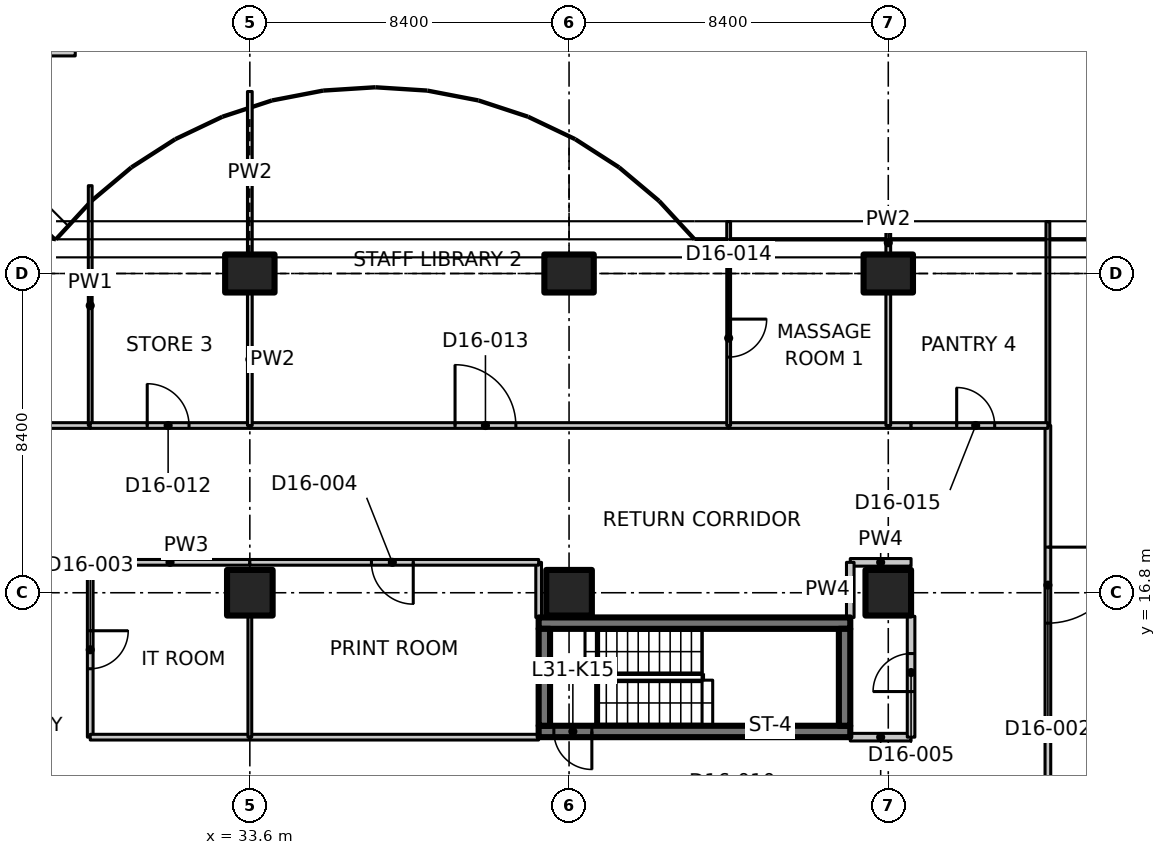
"""IFC4 building model, lengths in metres.
Left out: names, types, materials, properties, quantities, classifications, styles, units other than length and angle.
Written with IfcOpenShell. Run it as: python <this file> out.ifc"""

import sys

from ifc_helpers import new_model, si_unit, direction, frame, frame_2d, origin, origin_2d, place, context, subcontext, project, spatial, polyline, rectangle, outline, extrude, element, fill, save


model = new_model("IFC4")
c1 = context("Model", 3, precision=1e-05, world=origin(), true_north=direction((0.0, 1.0)))
c2 = subcontext(c1, "Body", "Model", "MODEL_VIEW")
j1 = project(units=[si_unit("LENGTHUNIT", "METRE"), si_unit("PLANEANGLEUNIT", "RADIAN")], contexts=[c1])
p1 = place(None, origin())
s1 = spatial("IfcSite", under=j1, at=p1, CompositionType="ELEMENT")
p2 = place(p1, origin())
s2 = spatial("IfcBuilding", under=s1, at=p2, CompositionType="ELEMENT")
p3 = place(p2, frame((0.0, 0.0, 127.7)))
s3 = spatial("IfcBuildingStorey", under=s2, at=p3, CompositionType="ELEMENT", Elevation=127.7)
p4 = place(p3, frame((33.6, 16.8, 0.0), z_axis=(0.0, 0.0, 1.0), x_axis=(1.0, 0.0, 0.0)))
e1 = element("IfcColumn", 1, at=p4, inside=s3, PredefinedType="COLUMN", context=c2, shape_type="SweptSolid", body=[
    extrude(rectangle(XDim=1.2, YDim=1.2, at=origin_2d()), origin(), (0.0, 0.0, 1.0), 3.35),
])
p5 = place(p3, frame((33.6, 25.2, 0.0), z_axis=(0.0, 0.0, 1.0), x_axis=(0.0, 1.0, 0.0)))
e2 = element("IfcColumn", 2, at=p5, inside=s3, PredefinedType="COLUMN", context=c2, shape_type="SweptSolid", body=[
    extrude(rectangle(XDim=1.0, YDim=1.3, at=origin_2d()), origin(), (0.0, 0.0, 1.0), 3.35),
])
p6 = place(p3, frame((42.0, 16.8, 0.0), z_axis=(0.0, 0.0, 1.0), x_axis=(1.0, 0.0, 0.0)))
e3 = element("IfcColumn", 3, at=p6, inside=s3, PredefinedType="COLUMN", context=c2, shape_type="SweptSolid", body=[
    extrude(rectangle(XDim=1.2, YDim=1.2, at=origin_2d()), origin(), (0.0, 0.0, 1.0), 3.35),
])
p7 = place(p3, frame((42.0, 25.2, 0.0), z_axis=(0.0, 0.0, 1.0), x_axis=(0.0, 1.0, 0.0)))
e4 = element("IfcColumn", 4, at=p7, inside=s3, PredefinedType="COLUMN", context=c2, shape_type="SweptSolid", body=[
    extrude(rectangle(XDim=1.0, YDim=1.3, at=origin_2d()), origin(), (0.0, 0.0, 1.0), 3.35),
])
p8 = place(p3, frame((50.4, 16.8, 0.0), z_axis=(0.0, 0.0, 1.0), x_axis=(1.0, 0.0, 0.0)))
e5 = element("IfcColumn", 5, at=p8, inside=s3, PredefinedType="COLUMN", context=c2, shape_type="SweptSolid", body=[
    extrude(rectangle(XDim=1.2, YDim=1.2, at=origin_2d()), origin(), (0.0, 0.0, 1.0), 3.35),
])
p9 = place(p3, frame((50.4, 25.2, 0.0), z_axis=(0.0, 0.0, 1.0), x_axis=(0.0, 1.0, 0.0)))
e6 = element("IfcColumn", 6, at=p9, inside=s3, PredefinedType="COLUMN", context=c2, shape_type="SweptSolid", body=[
    extrude(rectangle(XDim=1.0, YDim=1.3, at=origin_2d()), origin(), (0.0, 0.0, 1.0), 3.35),
])
p10 = place(p3, frame((49.4, 13.15, 0.0), z_axis=(0.0, 0.0, 1.0), x_axis=(-1.0, 0.0, 0.0)))
e7 = element("IfcWall", 7, at=p10, inside=s3, PredefinedType="SHEAR", context=c2, shape_type="SweptSolid", body=[
    extrude(rectangle(XDim=8.2, YDim=0.3, at=frame_2d((4.1, 0.0))), origin(), (0.0, 0.0, 1.0), 3.35),
])
p11 = place(p10, frame((6.8, 0.0, 0.0)))
e8 = element("IfcOpeningElement", 8, at=p11, cuts=e7, PredefinedType="OPENING", context=c2, shape_type="SweptSolid", body=[
    extrude(rectangle(XDim=1.0, YDim=2.1, at=frame_2d((0.5, 1.05))), frame((0.0, 0.16, 0.0), z_axis=(0.0, -1.0, 0.0), x_axis=(1.0, 0.0, 0.0)), (0.0, 0.0, 1.0), 0.32),
])
p12 = place(p3, frame((41.2, 16.0, 0.0), z_axis=(0.0, 0.0, 1.0), x_axis=(1.0, 0.0, 0.0)))
e9 = element("IfcWall", 9, at=p12, inside=s3, PredefinedType="SHEAR", context=c2, shape_type="SweptSolid", body=[
    extrude(rectangle(XDim=8.2, YDim=0.3, at=frame_2d((4.1, 0.0))), origin(), (0.0, 0.0, 1.0), 3.35),
])
for number, where, z_axis, x_axis in (
    (10, (41.35, 13.3, 0.0), (0.0, 0.0, 1.0), (0.0, 1.0, 0.0)),
    (11, (49.25, 13.3, 0.0), (0.0, 0.0, 1.0), (0.0, 1.0, 0.0)),
):
    element("IfcWall", number, at=place(p3, frame(where, z_axis=z_axis, x_axis=x_axis)), inside=s3, PredefinedType="SHEAR", context=c2, shape_type="SweptSolid", body=[
        extrude(rectangle(XDim=2.55, YDim=0.3, at=frame_2d((1.275, 0.0))), origin(), (0.0, 0.0, 1.0), 3.35),
    ])
p13 = place(p3, frame((25.2, 21.2, 0.0), z_axis=(0.0, 0.0, 1.0), x_axis=(1.0, 0.0, 0.0)))
e12 = element("IfcWall", 12, at=p13, inside=s3, PredefinedType="PARTITIONING", context=c2, shape_type="SweptSolid", body=[
    extrude(rectangle(XDim=4.2, YDim=0.15, at=frame_2d((2.1, 0.0))), origin(), (0.0, 0.0, 1.0), 3.33),
])
p14 = place(p3, frame((29.4, 17.6, 0.0), z_axis=(0.0, 0.0, 1.0), x_axis=(0.0, -1.0, 0.0)))
e13 = element("IfcWall", 13, at=p14, inside=s3, PredefinedType="PARTITIONING", context=c2, shape_type="SweptSolid", body=[
    extrude(rectangle(XDim=4.6, YDim=0.15, at=frame_2d((2.3, 0.0))), origin(), (0.0, 0.0, 1.0), 3.33),
])
p15 = place(p14, frame((1.8, 0.0, 0.0)))
e14 = element("IfcOpeningElement", 14, at=p15, cuts=e13, PredefinedType="OPENING", context=c2, shape_type="SweptSolid", body=[
    extrude(rectangle(XDim=1.0, YDim=2.1, at=frame_2d((0.5, 1.05))), frame((0.0, 0.085, 0.0), z_axis=(0.0, -1.0, 0.0), x_axis=(1.0, 0.0, 0.0)), (0.0, 0.0, 1.0), 0.17),
])
p16 = place(p3, frame((29.4, 27.511, 0.0), z_axis=(0.0, 0.0, 1.0), x_axis=(0.0, -1.0, 0.0)))
e15 = element("IfcWall", 15, at=p16, inside=s3, PredefinedType="PARTITIONING", context=c2, shape_type="SweptSolid", body=[
    extrude(outline(polyline([(0.0, 0.0), (6.311, 0.0), (6.311, 3.33), (2.761, 3.33), (2.759, 2.98), (1.863, 2.98), (1.861, 3.33), (0.236, 3.33), (0.0, 3.33), (0.0, 0.0)])), frame((0.0, 0.05, 0.0), z_axis=(0.0, -1.0, 0.0), x_axis=(1.0, 0.0, 0.0)), (0.0, 0.0, 1.0), 0.1),
])
p17 = place(p3, frame((25.2, 31.0, 0.0), z_axis=(0.0, 0.0, 1.0), x_axis=(1.0, 0.0, 0.0)))
e16 = element("IfcWall", 16, at=p17, inside=s3, PredefinedType="PARTITIONING", context=c2, shape_type="SweptSolid", body=[
    extrude(rectangle(XDim=3.806, YDim=0.15, at=frame_2d((1.903, 0.0))), origin(), (0.0, 0.0, 1.0), 2.98),
])
p18 = place(p3, frame((54.6, 13.0, 0.0), z_axis=(0.0, 0.0, 1.0), x_axis=(0.0, -1.0, 0.0)))
e17 = element("IfcWall", 17, at=p18, inside=s3, PredefinedType="PARTITIONING", context=c2, shape_type="SweptSolid", body=[
    extrude(rectangle(XDim=3.4, YDim=0.15, at=frame_2d((1.7, 0.0))), origin(), (0.0, 0.0, 1.0), 3.33),
])
p19 = place(p3, frame((29.4, 13.0, 0.0), z_axis=(0.0, 0.0, 1.0), x_axis=(1.0, 0.0, 0.0)))
e18 = element("IfcWall", 18, at=p19, inside=s3, PredefinedType="PARTITIONING", context=c2, shape_type="SweptSolid", body=[
    extrude(rectangle(XDim=4.2, YDim=0.15, at=frame_2d((2.1, 0.0))), origin(), (0.0, 0.0, 1.0), 3.33),
])
p20 = place(p3, frame((33.6, 13.0, 0.0), z_axis=(0.0, 0.0, 1.0), x_axis=(1.0, 0.0, 0.0)))
e19 = element("IfcWall", 19, at=p20, inside=s3, PredefinedType="PARTITIONING", context=c2, shape_type="SweptSolid", body=[
    extrude(rectangle(XDim=7.6, YDim=0.15, at=frame_2d((3.8, 0.0))), origin(), (0.0, 0.0, 1.0), 3.33),
])
p21 = place(p3, frame((49.4, 13.0, 0.0), z_axis=(0.0, 0.0, 1.0), x_axis=(1.0, 0.0, 0.0)))
e20 = element("IfcWall", 20, at=p21, inside=s3, PredefinedType="PARTITIONING", context=c2, shape_type="SweptSolid", body=[
    extrude(rectangle(XDim=1.6, YDim=0.2, at=frame_2d((0.8, 0.0))), origin(), (0.0, 0.0, 1.0), 3.33),
])
p22 = place(p3, frame((54.6, 21.2, 0.0), z_axis=(0.0, 0.0, 1.0), x_axis=(0.0, -1.0, 0.0)))
e21 = element("IfcWall", 21, at=p22, inside=s3, PredefinedType="PARTITIONING", context=c2, shape_type="SweptSolid", body=[
    extrude(rectangle(XDim=8.2, YDim=0.15, at=frame_2d((4.1, 0.0))), origin(), (0.0, 0.0, 1.0), 3.33),
])
p23 = place(p22, frame((3.2, 0.0, 0.0)))
e22 = element("IfcOpeningElement", 22, at=p23, cuts=e21, PredefinedType="OPENING", context=c2, shape_type="SweptSolid", body=[
    extrude(rectangle(XDim=2.0, YDim=2.4, at=frame_2d((1.0, 1.2))), frame((0.0, 0.085, 0.0), z_axis=(0.0, -1.0, 0.0), x_axis=(1.0, 0.0, 0.0)), (0.0, 0.0, 1.0), 0.17),
])
p24 = place(p3, frame((54.6, 21.2, 0.0), z_axis=(0.0, 0.0, 1.0), x_axis=(0.0, 1.0, 0.0)))
e23 = element("IfcWall", 23, at=p24, inside=s3, PredefinedType="PARTITIONING", context=c2, shape_type="SweptSolid", body=[
    extrude(outline(polyline([(0.0, 0.0), (5.365, 0.0), (5.365, 3.33), (5.1, 3.33), (4.45, 3.33), (4.448, 2.98), (3.552, 2.98), (3.55, 3.33), (0.0, 3.33), (0.0, 0.0)])), frame((0.0, 0.05, 0.0), z_axis=(0.0, -1.0, 0.0), x_axis=(1.0, 0.0, 0.0)), (0.0, 0.0, 1.0), 0.1),
])
p25 = place(p3, frame((33.6, 17.6, 0.0), z_axis=(0.0, 0.0, 1.0), x_axis=(-1.0, 0.0, 0.0)))
e24 = element("IfcWall", 24, at=p25, inside=s3, PredefinedType="PARTITIONING", context=c2, shape_type="SweptSolid", body=[
    extrude(rectangle(XDim=4.2, YDim=0.15, at=frame_2d((2.1, 0.0))), origin(), (0.0, 0.0, 1.0), 3.33),
])
p26 = place(p3, frame((41.2, 16.15, 0.0), z_axis=(0.0, 0.0, 1.0), x_axis=(0.0, 1.0, 0.0)))
e25 = element("IfcWall", 25, at=p26, inside=s3, PredefinedType="PARTITIONING", context=c2, shape_type="SweptSolid", body=[
    extrude(rectangle(XDim=1.45, YDim=0.15, at=frame_2d((0.725, 0.0))), origin(), (0.0, 0.0, 1.0), 3.33),
])
p27 = place(p3, frame((41.2, 17.6, 0.0), z_axis=(0.0, 0.0, 1.0), x_axis=(-1.0, 0.0, 0.0)))
e26 = element("IfcWall", 26, at=p27, inside=s3, PredefinedType="PARTITIONING", context=c2, shape_type="SweptSolid", body=[
    extrude(rectangle(XDim=7.6, YDim=0.15, at=frame_2d((3.8, 0.0))), origin(), (0.0, 0.0, 1.0), 3.33),
])
p28 = place(p27, frame((3.3, 0.0, 0.0)))
e27 = element("IfcOpeningElement", 27, at=p28, cuts=e26, PredefinedType="OPENING", context=c2, shape_type="SweptSolid", body=[
    extrude(rectangle(XDim=1.1, YDim=2.1, at=frame_2d((0.55, 1.05))), frame((0.0, 0.085, 0.0), z_axis=(0.0, -1.0, 0.0), x_axis=(1.0, 0.0, 0.0)), (0.0, 0.0, 1.0), 0.17),
])
p29 = place(p3, frame((51.0, 17.6, 0.0), z_axis=(0.0, 0.0, 1.0), x_axis=(-1.0, 0.0, 0.0)))
e28 = element("IfcWall", 28, at=p29, inside=s3, PredefinedType="PARTITIONING", context=c2, shape_type="SweptSolid", body=[
    extrude(rectangle(XDim=1.6, YDim=0.2, at=frame_2d((0.8, 0.0))), origin(), (0.0, 0.0, 1.0), 3.33),
])
p30 = place(p3, frame((49.4, 17.6, 0.0), z_axis=(0.0, 0.0, 1.0), x_axis=(0.0, -1.0, 0.0)))
e29 = element("IfcWall", 29, at=p30, inside=s3, PredefinedType="PARTITIONING", context=c2, shape_type="SweptSolid", body=[
    extrude(rectangle(XDim=1.45, YDim=0.2, at=frame_2d((0.725, 0.0))), origin(), (0.0, 0.0, 1.0), 3.33),
])
p31 = place(p3, frame((29.4, 21.2, 0.0), z_axis=(0.0, 0.0, 1.0), x_axis=(1.0, 0.0, 0.0)))
e30 = element("IfcWall", 30, at=p31, inside=s3, PredefinedType="PARTITIONING", context=c2, shape_type="SweptSolid", body=[
    extrude(rectangle(XDim=4.2, YDim=0.15, at=frame_2d((2.1, 0.0))), origin(), (0.0, 0.0, 1.0), 3.33),
])
p32 = place(p31, frame((1.5, 0.0, 0.0)))
e31 = element("IfcOpeningElement", 31, at=p32, cuts=e30, PredefinedType="OPENING", context=c2, shape_type="SweptSolid", body=[
    extrude(rectangle(XDim=1.1, YDim=2.1, at=frame_2d((0.55, 1.05))), frame((0.0, 0.085, 0.0), z_axis=(0.0, -1.0, 0.0), x_axis=(1.0, 0.0, 0.0)), (0.0, 0.0, 1.0), 0.17),
])
p33 = place(p3, frame((33.6, 21.2, 0.0), z_axis=(0.0, 0.0, 1.0), x_axis=(1.0, 0.0, 0.0)))
e32 = element("IfcWall", 32, at=p33, inside=s3, PredefinedType="PARTITIONING", context=c2, shape_type="SweptSolid", body=[
    extrude(rectangle(XDim=12.6, YDim=0.15, at=frame_2d((6.3, 0.0))), origin(), (0.0, 0.0, 1.0), 3.33),
])
p34 = place(p33, frame((5.4, 0.0, 0.0)))
e33 = element("IfcOpeningElement", 33, at=p34, cuts=e32, PredefinedType="OPENING", context=c2, shape_type="SweptSolid", body=[
    extrude(rectangle(XDim=1.6, YDim=2.1, at=frame_2d((0.8, 1.05))), frame((0.0, 0.085, 0.0), z_axis=(0.0, -1.0, 0.0), x_axis=(1.0, 0.0, 0.0)), (0.0, 0.0, 1.0), 0.17),
])
p35 = place(p3, frame((46.2, 21.2, 0.0), z_axis=(0.0, 0.0, 1.0), x_axis=(1.0, 0.0, 0.0)))
e34 = element("IfcWall", 34, at=p35, inside=s3, PredefinedType="PARTITIONING", context=c2, shape_type="SweptSolid", body=[
    extrude(rectangle(XDim=4.2, YDim=0.15, at=frame_2d((2.1, 0.0))), origin(), (0.0, 0.0, 1.0), 3.33),
])
p36 = place(p3, frame((50.4, 21.2, 0.0), z_axis=(0.0, 0.0, 1.0), x_axis=(1.0, 0.0, 0.0)))
e35 = element("IfcWall", 35, at=p36, inside=s3, PredefinedType="PARTITIONING", context=c2, shape_type="SweptSolid", body=[
    extrude(rectangle(XDim=0.6, YDim=0.15, at=frame_2d((0.3, 0.0))), origin(), (0.0, 0.0, 1.0), 3.33),
])
p37 = place(p3, frame((51.0, 13.0, 0.0), z_axis=(0.0, 0.0, 1.0), x_axis=(0.0, 1.0, 0.0)))
e36 = element("IfcWall", 36, at=p37, inside=s3, PredefinedType="PARTITIONING", context=c2, shape_type="SweptSolid", body=[
    extrude(rectangle(XDim=3.18, YDim=0.2, at=frame_2d((1.59, 0.0))), origin(), (0.0, 0.0, 1.0), 3.33),
])
p38 = place(p37, frame((1.2, 0.0, 0.0)))
e37 = element("IfcOpeningElement", 37, at=p38, cuts=e36, PredefinedType="OPENING", context=c2, shape_type="SweptSolid", body=[
    extrude(rectangle(XDim=1.0, YDim=2.1, at=frame_2d((0.5, 1.05))), frame((0.0, 0.11, 0.0), z_axis=(0.0, -1.0, 0.0), x_axis=(1.0, 0.0, 0.0)), (0.0, 0.0, 1.0), 0.22),
])
p39 = place(p3, frame((51.0, 21.2, 0.0), z_axis=(0.0, 0.0, 1.0), x_axis=(1.0, 0.0, 0.0)))
e38 = element("IfcWall", 38, at=p39, inside=s3, PredefinedType="PARTITIONING", context=c2, shape_type="SweptSolid", body=[
    extrude(rectangle(XDim=3.6, YDim=0.15, at=frame_2d((1.8, 0.0))), origin(), (0.0, 0.0, 1.0), 3.33),
])
p40 = place(p39, frame((1.2, 0.0, 0.0)))
e39 = element("IfcOpeningElement", 39, at=p40, cuts=e38, PredefinedType="OPENING", context=c2, shape_type="SweptSolid", body=[
    extrude(rectangle(XDim=1.0, YDim=2.1, at=frame_2d((0.5, 1.05))), frame((0.0, 0.085, 0.0), z_axis=(0.0, -1.0, 0.0), x_axis=(1.0, 0.0, 0.0)), (0.0, 0.0, 1.0), 0.17),
])
p41 = place(p3, frame((33.6, 16.18, 0.0), z_axis=(0.0, 0.0, 1.0), x_axis=(0.0, -1.0, 0.0)))
e40 = element("IfcWall", 40, at=p41, inside=s3, PredefinedType="PARTITIONING", context=c2, shape_type="SweptSolid", body=[
    extrude(rectangle(XDim=3.18, YDim=0.1, at=frame_2d((1.59, 0.0))), origin(), (0.0, 0.0, 1.0), 3.33),
])
p42 = place(p3, frame((33.6, 29.988, 0.0), z_axis=(0.0, 0.0, 1.0), x_axis=(0.0, -1.0, 0.0)))
e41 = element("IfcWall", 41, at=p42, inside=s3, PredefinedType="PARTITIONING", context=c2, shape_type="SweptSolid", body=[
    extrude(rectangle(XDim=4.268, YDim=0.125, at=frame_2d((2.134, 0.0))), origin(), (0.0, 0.0, 1.0), 2.98),
])
p43 = place(p3, frame((33.6, 24.68, 0.0), z_axis=(0.0, 0.0, 1.0), x_axis=(0.0, -1.0, 0.0)))
e42 = element("IfcWall", 42, at=p43, inside=s3, PredefinedType="PARTITIONING", context=c2, shape_type="SweptSolid", body=[
    extrude(rectangle(XDim=3.48, YDim=0.125, at=frame_2d((1.74, 0.0))), origin(), (0.0, 0.0, 1.0), 3.33),
])
p44 = place(p3, frame((46.2, 26.565, 0.0), z_axis=(0.0, 0.0, 1.0), x_axis=(0.0, -1.0, 0.0)))
e43 = element("IfcWall", 43, at=p44, inside=s3, PredefinedType="PARTITIONING", context=c2, shape_type="SweptSolid", body=[
    extrude(outline(polyline([(0.0, 0.0), (5.365, 0.0), (5.365, 3.33), (1.815, 3.33), (1.813, 2.98), (0.917, 2.98), (0.915, 3.33), (0.265, 3.33), (0.0, 3.33), (0.0, 0.0)])), frame((0.0, 0.05, 0.0), z_axis=(0.0, -1.0, 0.0), x_axis=(1.0, 0.0, 0.0)), (0.0, 0.0, 1.0), 0.1),
])
p45 = place(p44, frame((2.565, 0.0, 0.0)))
e44 = element("IfcOpeningElement", 44, at=p45, cuts=e43, PredefinedType="OPENING", context=c2, shape_type="SweptSolid", body=[
    extrude(rectangle(XDim=1.0, YDim=2.1, at=frame_2d((0.5, 1.05))), frame((0.0, 0.06, 0.0), z_axis=(0.0, -1.0, 0.0), x_axis=(1.0, 0.0, 0.0)), (0.0, 0.0, 1.0), 0.12),
])
p46 = place(p3, frame((50.4, 26.3, 0.0), z_axis=(0.0, 0.0, 1.0), x_axis=(0.0, -1.0, 0.0)))
e45 = element("IfcWall", 45, at=p46, inside=s3, PredefinedType="PARTITIONING", context=c2, shape_type="SweptSolid", body=[
    extrude(rectangle(XDim=0.58, YDim=0.125, at=frame_2d((0.29, 0.0))), origin(), (0.0, 0.0, 1.0), 3.33),
])
p47 = place(p3, frame((50.4, 24.68, 0.0), z_axis=(0.0, 0.0, 1.0), x_axis=(0.0, -1.0, 0.0)))
e46 = element("IfcWall", 46, at=p47, inside=s3, PredefinedType="PARTITIONING", context=c2, shape_type="SweptSolid", body=[
    extrude(rectangle(XDim=3.48, YDim=0.125, at=frame_2d((1.74, 0.0))), origin(), (0.0, 0.0, 1.0), 3.33),
])
p48 = place(p11, origin())
e47 = element("IfcDoor", 47, at=p48, inside=s3, OperationType="SINGLE_SWING_RIGHT", PredefinedType="DOOR", context=c2, shape_type="SweptSolid", body=[
    extrude(rectangle(XDim=1.0, YDim=2.1, at=frame_2d((0.5, 1.05))), frame((0.0, 0.025, 0.0), z_axis=(0.0, -1.0, 0.0), x_axis=(1.0, 0.0, 0.0)), (0.0, 0.0, 1.0), 0.05),
])
fill(e8, e47)
p49 = place(p23, origin())
e48 = element("IfcDoor", 48, at=p49, inside=s3, OperationType="DOUBLE_DOOR_SINGLE_SWING", PredefinedType="DOOR", context=c2, shape_type="SweptSolid", body=[
    extrude(rectangle(XDim=2.0, YDim=2.4, at=frame_2d((1.0, 1.2))), frame((0.0, 0.025, 0.0), z_axis=(0.0, -1.0, 0.0), x_axis=(1.0, 0.0, 0.0)), (0.0, 0.0, 1.0), 0.05),
])
fill(e22, e48)
p50 = place(p15, origin())
e49 = element("IfcDoor", 49, at=p50, inside=s3, OperationType="SINGLE_SWING_LEFT", PredefinedType="DOOR", context=c2, shape_type="SweptSolid", body=[
    extrude(rectangle(XDim=1.0, YDim=2.1, at=frame_2d((0.5, 1.05))), frame((0.0, 0.025, 0.0), z_axis=(0.0, -1.0, 0.0), x_axis=(1.0, 0.0, 0.0)), (0.0, 0.0, 1.0), 0.05),
])
fill(e14, e49)
p51 = place(p28, origin())
e50 = element("IfcDoor", 50, at=p51, inside=s3, OperationType="SINGLE_SWING_LEFT", PredefinedType="DOOR", context=c2, shape_type="SweptSolid", body=[
    extrude(rectangle(XDim=1.1, YDim=2.1, at=frame_2d((0.55, 1.05))), frame((0.0, 0.025, 0.0), z_axis=(0.0, -1.0, 0.0), x_axis=(1.0, 0.0, 0.0)), (0.0, 0.0, 1.0), 0.05),
])
fill(e27, e50)
p52 = place(p38, origin())
e51 = element("IfcDoor", 51, at=p52, inside=s3, OperationType="SINGLE_SWING_LEFT", PredefinedType="DOOR", context=c2, shape_type="SweptSolid", body=[
    extrude(rectangle(XDim=1.0, YDim=2.1, at=frame_2d((0.5, 1.05))), frame((0.0, 0.025, 0.0), z_axis=(0.0, -1.0, 0.0), x_axis=(1.0, 0.0, 0.0)), (0.0, 0.0, 1.0), 0.05),
])
fill(e37, e51)
p53 = place(p32, origin())
e52 = element("IfcDoor", 52, at=p53, inside=s3, OperationType="SINGLE_SWING_LEFT", PredefinedType="DOOR", context=c2, shape_type="SweptSolid", body=[
    extrude(rectangle(XDim=1.1, YDim=2.1, at=frame_2d((0.55, 1.05))), frame((0.0, 0.025, 0.0), z_axis=(0.0, -1.0, 0.0), x_axis=(1.0, 0.0, 0.0)), (0.0, 0.0, 1.0), 0.05),
])
fill(e31, e52)
p54 = place(p34, origin())
e53 = element("IfcDoor", 53, at=p54, inside=s3, OperationType="DOUBLE_DOOR_SINGLE_SWING", PredefinedType="DOOR", context=c2, shape_type="SweptSolid", body=[
    extrude(rectangle(XDim=1.6, YDim=2.1, at=frame_2d((0.8, 1.05))), frame((0.0, 0.025, 0.0), z_axis=(0.0, -1.0, 0.0), x_axis=(1.0, 0.0, 0.0)), (0.0, 0.0, 1.0), 0.05),
])
fill(e33, e53)
p55 = place(p45, origin())
e54 = element("IfcDoor", 54, at=p55, inside=s3, OperationType="SINGLE_SWING_LEFT", PredefinedType="DOOR", context=c2, shape_type="SweptSolid", body=[
    extrude(rectangle(XDim=1.0, YDim=2.1, at=frame_2d((0.5, 1.05))), frame((0.0, 0.025, 0.0), z_axis=(0.0, -1.0, 0.0), x_axis=(1.0, 0.0, 0.0)), (0.0, 0.0, 1.0), 0.05),
])
fill(e44, e54)
p56 = place(p40, origin())
e55 = element("IfcDoor", 55, at=p56, inside=s3, OperationType="SINGLE_SWING_LEFT", PredefinedType="DOOR", context=c2, shape_type="SweptSolid", body=[
    extrude(rectangle(XDim=1.0, YDim=2.1, at=frame_2d((0.5, 1.05))), frame((0.0, 0.025, 0.0), z_axis=(0.0, -1.0, 0.0), x_axis=(1.0, 0.0, 0.0)), (0.0, 0.0, 1.0), 0.05),
])
fill(e39, e55)
save(model, sys.argv[1])
